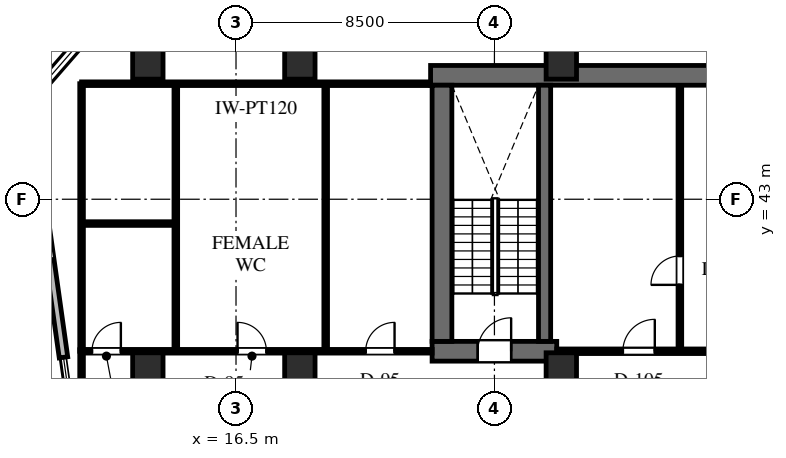
"""IFC4 building model, lengths in metres.
Left out: names, types, materials, properties, quantities, classifications, styles, units other than length and angle.
Written with IfcOpenShell. Run it as: python <this file> out.ifc"""

import sys

from ifc_helpers import new_model, si_unit, direction, frame, frame_2d, origin, origin_2d, place, context, subcontext, project, spatial, rectangle, extrude, element, fill, save


model = new_model("IFC4")
c1 = context("Model", 3, precision=1e-05, world=origin(), true_north=direction((0.0, 1.0)))
c2 = subcontext(c1, "Body", "Model", "MODEL_VIEW")
j1 = project(units=[si_unit("LENGTHUNIT", "METRE"), si_unit("PLANEANGLEUNIT", "RADIAN")], contexts=[c1])
p1 = place(None, origin())
s1 = spatial("IfcSite", under=j1, at=p1, CompositionType="ELEMENT")
p2 = place(p1, origin())
s2 = spatial("IfcBuilding", under=s1, at=p2, CompositionType="ELEMENT")
p3 = place(p2, frame((0.0, 0.0, 136.0)))
s3 = spatial("IfcBuildingStorey", under=s2, at=p3, CompositionType="ELEMENT", Elevation=136.0)
p4 = place(p3, frame((22.9, 47.075, 0.0), z_axis=(0.0, 0.0, 1.0), x_axis=(1.0, 0.0, 0.0)))
e1 = element("IfcWall", 1, at=p4, inside=s3, PredefinedType="SHEAR", context=c2, shape_type="SweptSolid", body=[
    extrude(rectangle(XDim=43.6, YDim=0.65, at=frame_2d((21.8, 0.0))), origin(), (0.0, 0.0, 1.0), 4.0),
])
p5 = place(p3, frame((22.95, 38.0, 0.0), z_axis=(0.0, 0.0, 1.0), x_axis=(1.0, 0.0, 0.0)))
e2 = element("IfcWall", 2, at=p5, inside=s3, PredefinedType="SHEAR", context=c2, shape_type="SweptSolid", body=[
    extrude(rectangle(XDim=4.1, YDim=0.65, at=frame_2d((2.05, 0.0))), origin(), (0.0, 0.0, 1.0), 4.0),
])
p6 = place(p5, frame((1.5, 0.0, 0.0)))
e3 = element("IfcOpeningElement", 3, at=p6, cuts=e2, PredefinedType="OPENING", context=c2, shape_type="SweptSolid", body=[
    extrude(rectangle(XDim=1.1, YDim=2.2, at=frame_2d((0.55, 1.1))), frame((0.0, 0.335, 0.0), z_axis=(0.0, -1.0, 0.0), x_axis=(1.0, 0.0, 0.0)), (0.0, 0.0, 1.0), 0.67),
])
p7 = place(p3, frame((23.275, 38.325, 0.0), z_axis=(0.0, 0.0, 1.0), x_axis=(0.0, 1.0, 0.0)))
e4 = element("IfcWall", 4, at=p7, inside=s3, PredefinedType="SHEAR", context=c2, shape_type="SweptSolid", body=[
    extrude(rectangle(XDim=8.425, YDim=0.65, at=frame_2d((4.212, 0.0))), origin(), (0.0, 0.0, 1.0), 4.0),
])
p8 = place(p3, frame((26.65, 38.325, 0.0), z_axis=(0.0, 0.0, 1.0), x_axis=(0.0, 1.0, 0.0)))
e5 = element("IfcWall", 5, at=p8, inside=s3, PredefinedType="SHEAR", context=c2, shape_type="SweptSolid", body=[
    extrude(rectangle(XDim=8.425, YDim=0.4, at=frame_2d((4.212, 0.0))), origin(), (0.0, 0.0, 1.0), 4.0),
])
for number, where, z_axis, x_axis in (
    (6, (27.2, 37.35, 0.0), (0.0, 0.0, 1.0), (1.0, 0.0, 0.0)),
    (7, (27.2, 47.55, 0.0), (0.0, 0.0, 1.0), (1.0, 0.0, 0.0)),
    (8, (18.6, 37.35, 0.0), (0.0, 0.0, 1.0), (1.0, 0.0, 0.0)),
    (9, (18.6, 47.55, 0.0), (0.0, 0.0, 1.0), (1.0, 0.0, 0.0)),
    (10, (13.6, 37.35, 0.0), (0.0, 0.0, 1.0), (1.0, 0.0, 0.0)),
    (11, (13.6, 47.55, 0.0), (0.0, 0.0, 1.0), (1.0, 0.0, 0.0)),
):
    element("IfcColumn", number, at=place(p3, frame(where, z_axis=z_axis, x_axis=x_axis)), inside=s3, PredefinedType="COLUMN", context=c2, shape_type="SweptSolid", body=[
        extrude(rectangle(XDim=1.0, YDim=1.2, at=origin_2d()), origin(), (0.0, 0.0, 1.0), 4.0),
    ])
p9 = place(p3, frame((10.825, 37.8, 0.0), z_axis=(0.0, 0.0, 1.0), x_axis=(-0.139180610108, 0.990267013371, 0.0)))
e12 = element("IfcWall", 12, at=p9, inside=s3, PredefinedType="STANDARD", context=c2, shape_type="SweptSolid", body=[
    extrude(rectangle(XDim=8.467, YDim=0.28, at=frame_2d((4.234, 0.0))), origin(), (0.0, 0.0, 1.0), 3.75),
])
p10 = place(p9, frame((3.273, 0.0, 0.65)))
e13 = element("IfcOpeningElement", 13, at=p10, cuts=e12, PredefinedType="OPENING", context=c2, shape_type="SweptSolid", body=[
    extrude(rectangle(XDim=1.8, YDim=2.1, at=frame_2d((0.9, 1.05))), frame((0.0, 0.15, 0.0), z_axis=(0.0, -1.0, 0.0), x_axis=(1.0, 0.0, 0.0)), (0.0, 0.0, 1.0), 0.3),
])
p11 = place(p3, frame((9.646, 46.185, 0.0), z_axis=(0.0, 0.0, 1.0), x_axis=(0.656070644076, 0.754699483226, 0.0)))
e14 = element("IfcWall", 14, at=p11, inside=s3, PredefinedType="STANDARD", context=c2, shape_type="SweptSolid", body=[
    extrude(rectangle(XDim=2.908, YDim=0.28, at=frame_2d((1.454, 0.0))), origin(), (0.0, 0.0, 1.0), 3.75),
])
p12 = place(p11, frame((0.541, 0.0, 0.65)))
e15 = element("IfcOpeningElement", 15, at=p12, cuts=e14, PredefinedType="OPENING", context=c2, shape_type="SweptSolid", body=[
    extrude(rectangle(XDim=1.8, YDim=2.1, at=frame_2d((0.9, 1.05))), frame((0.0, 0.15, 0.0), z_axis=(0.0, -1.0, 0.0), x_axis=(1.0, 0.0, 0.0)), (0.0, 0.0, 1.0), 0.3),
])
p13 = place(p3, frame((27.05, 38.0, 0.0), z_axis=(0.0, 0.0, 1.0), x_axis=(1.0, 0.0, 0.0)))
e16 = element("IfcWall", 16, at=p13, inside=s3, PredefinedType="PARTITIONING", context=c2, shape_type="SweptSolid", body=[
    extrude(rectangle(XDim=7.95, YDim=0.15, at=frame_2d((3.975, 0.0))), origin(), (0.0, 0.0, 1.0), 2.894),
])
p14 = place(p13, frame((2.175, 0.0, 0.0)))
e17 = element("IfcOpeningElement", 17, at=p14, cuts=e16, PredefinedType="OPENING", context=c2, shape_type="SweptSolid", body=[
    extrude(rectangle(XDim=1.05, YDim=2.2, at=frame_2d((0.525, 1.1))), frame((0.0, 0.085, 0.0), z_axis=(0.0, -1.0, 0.0), x_axis=(1.0, 0.0, 0.0)), (0.0, 0.0, 1.0), 0.17),
])
p15 = place(p3, frame((31.1, 38.068, 0.0), z_axis=(0.0, 0.0, 1.0), x_axis=(0.0, 1.0, 0.0)))
e18 = element("IfcWall", 18, at=p15, inside=s3, PredefinedType="PARTITIONING", context=c2, shape_type="SweptSolid", body=[
    extrude(rectangle(XDim=8.674, YDim=0.12, at=frame_2d((4.337, 0.0))), origin(), (0.0, 0.0, 1.0), 3.75),
])
p16 = place(p15, frame((2.116, 0.0, 0.0)))
e19 = element("IfcOpeningElement", 19, at=p16, cuts=e18, PredefinedType="OPENING", context=c2, shape_type="SweptSolid", body=[
    extrude(rectangle(XDim=0.95, YDim=2.15, at=frame_2d((0.475, 1.075))), frame((0.0, 0.07, 0.0), z_axis=(0.0, -1.0, 0.0), x_axis=(1.0, 0.0, 0.0)), (0.0, 0.0, 1.0), 0.14),
])
p17 = place(p3, frame((11.42, 38.0, 0.0), z_axis=(0.0, 0.0, 1.0), x_axis=(1.0, 0.0, 0.0)))
e20 = element("IfcWall", 20, at=p17, inside=s3, PredefinedType="PARTITIONING", context=c2, shape_type="SweptSolid", body=[
    extrude(rectangle(XDim=11.53, YDim=0.12, at=frame_2d((5.765, 0.0))), origin(), (0.0, 0.0, 1.0), 2.894),
])
p18 = place(p17, frame((0.343, 0.0, 0.0)))
e21 = element("IfcOpeningElement", 21, at=p18, cuts=e20, PredefinedType="OPENING", context=c2, shape_type="SweptSolid", body=[
    extrude(rectangle(XDim=0.95, YDim=2.15, at=frame_2d((0.475, 1.075))), frame((0.0, 0.07, 0.0), z_axis=(0.0, -1.0, 0.0), x_axis=(1.0, 0.0, 0.0)), (0.0, 0.0, 1.0), 0.14),
])
p19 = place(p17, frame((5.13, 0.0, 0.0)))
e22 = element("IfcOpeningElement", 22, at=p19, cuts=e20, PredefinedType="OPENING", context=c2, shape_type="SweptSolid", body=[
    extrude(rectangle(XDim=0.95, YDim=2.15, at=frame_2d((0.475, 1.075))), frame((0.0, 0.07, 0.0), z_axis=(0.0, -1.0, 0.0), x_axis=(1.0, 0.0, 0.0)), (0.0, 0.0, 1.0), 0.14),
])
p20 = place(p17, frame((9.345, 0.0, 0.0)))
e23 = element("IfcOpeningElement", 23, at=p20, cuts=e20, PredefinedType="OPENING", context=c2, shape_type="SweptSolid", body=[
    extrude(rectangle(XDim=0.95, YDim=2.15, at=frame_2d((0.475, 1.075))), frame((0.0, 0.07, 0.0), z_axis=(0.0, -1.0, 0.0), x_axis=(1.0, 0.0, 0.0)), (0.0, 0.0, 1.0), 0.14),
])
p21 = place(p3, frame((11.42, 38.0, 0.0), z_axis=(0.0, 0.0, 1.0), x_axis=(0.0, 1.0, 0.0)))
e24 = element("IfcWall", 24, at=p21, inside=s3, PredefinedType="PARTITIONING", context=c2, shape_type="SweptSolid", body=[
    extrude(rectangle(XDim=8.8, YDim=0.12, at=frame_2d((4.4, 0.0))), origin(), (0.0, 0.0, 1.0), 3.75),
])
p22 = place(p3, frame((11.42, 46.8, 0.0), z_axis=(0.0, 0.0, 1.0), x_axis=(1.0, 0.0, 0.0)))
e25 = element("IfcWall", 25, at=p22, inside=s3, PredefinedType="PARTITIONING", context=c2, shape_type="SweptSolid", body=[
    extrude(rectangle(XDim=11.48, YDim=0.12, at=frame_2d((5.74, 0.0))), origin(), (0.0, 0.0, 1.0), 2.894),
])
for number, where, z_axis, x_axis in (
    (26, (14.52, 38.068, 0.0), (0.0, 0.0, 1.0), (0.0, 1.0, 0.0)),
    (27, (19.45, 38.068, 0.0), (0.0, 0.0, 1.0), (0.0, 1.0, 0.0)),
):
    element("IfcWall", number, at=place(p3, frame(where, z_axis=z_axis, x_axis=x_axis)), inside=s3, PredefinedType="PARTITIONING", context=c2, shape_type="SweptSolid", body=[
        extrude(rectangle(XDim=8.664, YDim=0.12, at=frame_2d((4.332, 0.0))), origin(), (0.0, 0.0, 1.0), 3.75),
    ])
p23 = place(p3, frame((11.488, 42.2, 0.0), z_axis=(0.0, 0.0, 1.0), x_axis=(1.0, 0.0, 0.0)))
e28 = element("IfcWall", 28, at=p23, inside=s3, PredefinedType="PARTITIONING", context=c2, shape_type="SweptSolid", body=[
    extrude(rectangle(XDim=2.964, YDim=0.12, at=frame_2d((1.482, 0.0))), origin(), (0.0, 0.0, 1.0), 2.894),
])
p24 = place(p3, frame((11.42, 34.4, 0.0), z_axis=(0.0, 0.0, 1.0), x_axis=(0.0, 1.0, 0.0)))
e29 = element("IfcWall", 29, at=p24, inside=s3, PredefinedType="PARTITIONING", context=c2, shape_type="SweptSolid", body=[
    extrude(rectangle(XDim=3.65, YDim=0.12, at=frame_2d((1.825, 0.0))), origin(), (0.0, 0.0, 1.0), 3.75),
])
p25 = place(p12, origin())
e30 = element("IfcWindow", 30, at=p25, inside=s3, PartitioningType="SINGLE_PANEL", PredefinedType="WINDOW", context=c2, shape_type="SweptSolid", body=[
    extrude(rectangle(XDim=1.8, YDim=2.1, at=frame_2d((0.9, 1.05))), frame((0.0, 0.03, 0.0), z_axis=(0.0, -1.0, 0.0), x_axis=(1.0, 0.0, 0.0)), (0.0, 0.0, 1.0), 0.06),
])
fill(e15, e30)
p26 = place(p6, origin())
e31 = element("IfcDoor", 31, at=p26, inside=s3, OperationType="SINGLE_SWING_RIGHT", PredefinedType="DOOR", context=c2, shape_type="SweptSolid", body=[
    extrude(rectangle(XDim=1.1, YDim=2.2, at=frame_2d((0.55, 1.1))), frame((0.0, 0.025, 0.0), z_axis=(0.0, -1.0, 0.0), x_axis=(1.0, 0.0, 0.0)), (0.0, 0.0, 1.0), 0.05),
])
fill(e3, e31)
p27 = place(p14, origin())
e32 = element("IfcDoor", 32, at=p27, inside=s3, OperationType="SINGLE_SWING_RIGHT", PredefinedType="DOOR", context=c2, shape_type="SweptSolid", body=[
    extrude(rectangle(XDim=1.05, YDim=2.2, at=frame_2d((0.525, 1.1))), frame((0.0, 0.025, 0.0), z_axis=(0.0, -1.0, 0.0), x_axis=(1.0, 0.0, 0.0)), (0.0, 0.0, 1.0), 0.05),
])
fill(e17, e32)
p28 = place(p16, origin())
e33 = element("IfcDoor", 33, at=p28, inside=s3, OperationType="SINGLE_SWING_LEFT", PredefinedType="DOOR", context=c2, shape_type="SweptSolid", body=[
    extrude(rectangle(XDim=0.95, YDim=2.15, at=frame_2d((0.475, 1.075))), frame((0.0, 0.025, 0.0), z_axis=(0.0, -1.0, 0.0), x_axis=(1.0, 0.0, 0.0)), (0.0, 0.0, 1.0), 0.05),
])
fill(e19, e33)
p29 = place(p18, origin())
e34 = element("IfcDoor", 34, at=p29, inside=s3, OperationType="SINGLE_SWING_RIGHT", PredefinedType="DOOR", context=c2, shape_type="SweptSolid", body=[
    extrude(rectangle(XDim=0.95, YDim=2.15, at=frame_2d((0.475, 1.075))), frame((0.0, 0.025, 0.0), z_axis=(0.0, -1.0, 0.0), x_axis=(1.0, 0.0, 0.0)), (0.0, 0.0, 1.0), 0.05),
])
fill(e21, e34)
p30 = place(p19, origin())
e35 = element("IfcDoor", 35, at=p30, inside=s3, OperationType="SINGLE_SWING_LEFT", PredefinedType="DOOR", context=c2, shape_type="SweptSolid", body=[
    extrude(rectangle(XDim=0.95, YDim=2.15, at=frame_2d((0.475, 1.075))), frame((0.0, 0.025, 0.0), z_axis=(0.0, -1.0, 0.0), x_axis=(1.0, 0.0, 0.0)), (0.0, 0.0, 1.0), 0.05),
])
fill(e22, e35)
p31 = place(p20, origin())
e36 = element("IfcDoor", 36, at=p31, inside=s3, OperationType="SINGLE_SWING_RIGHT", PredefinedType="DOOR", context=c2, shape_type="SweptSolid", body=[
    extrude(rectangle(XDim=0.95, YDim=2.15, at=frame_2d((0.475, 1.075))), frame((0.0, 0.025, 0.0), z_axis=(0.0, -1.0, 0.0), x_axis=(1.0, 0.0, 0.0)), (0.0, 0.0, 1.0), 0.05),
])
fill(e23, e36)
save(model, sys.argv[1])
